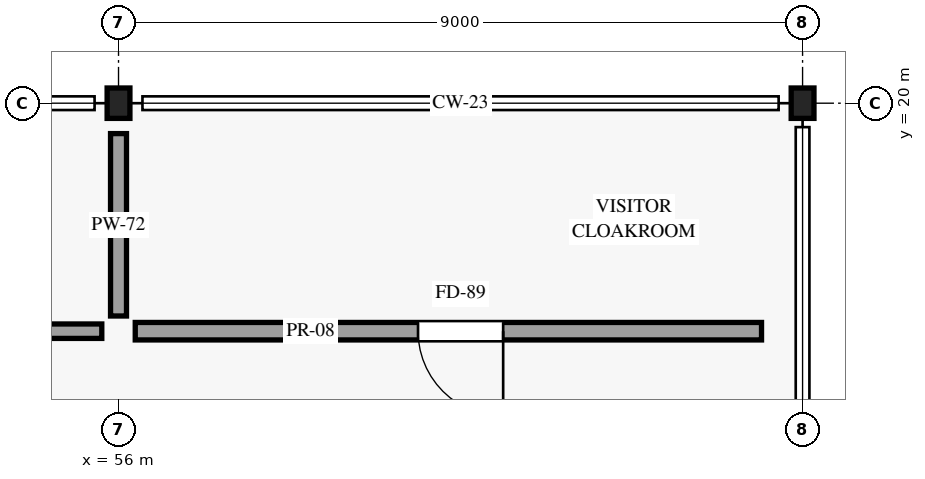
"""IFC4 building model, lengths in metres.
Left out: names, types, materials, properties, quantities, classifications, styles, units other than length and angle.
Written with IfcOpenShell. Run it as: python <this file> out.ifc"""

import sys

from ifc_helpers import new_model, si_unit, direction, frame, frame_2d, origin, origin_2d, place, context, subcontext, project, spatial, rectangle, i_section, extrude, element, fill, save


model = new_model("IFC4")
c1 = context("Model", 3, precision=1e-05, world=origin(), true_north=direction((0.0, 1.0)))
c2 = subcontext(c1, "Body", "Model", "MODEL_VIEW")
j1 = project(units=[si_unit("LENGTHUNIT", "METRE"), si_unit("PLANEANGLEUNIT", "RADIAN")], contexts=[c1])
p1 = place(None, origin())
s1 = spatial("IfcSite", under=j1, at=p1, CompositionType="ELEMENT")
p2 = place(p1, origin())
s2 = spatial("IfcBuilding", under=s1, at=p2, CompositionType="ELEMENT")
p3 = place(p2, frame((0.0, 0.0, 24.0)))
s3 = spatial("IfcBuildingStorey", under=s2, at=p3, CompositionType="ELEMENT", Elevation=24.0)
for number, where, z_axis, x_axis in (
    (1, (56.0, 20.0, 0.0), (0.0, 0.0, 1.0), (1.0, 0.0, 0.0)),
    (2, (65.0, 20.0, 0.0), (0.0, 0.0, 1.0), (1.0, 0.0, 0.0)),
):
    element("IfcColumn", number, at=place(p3, frame(where, z_axis=z_axis, x_axis=x_axis)), inside=s3, PredefinedType="COLUMN", context=c2, shape_type="SweptSolid", body=[
        extrude(i_section(OverallWidth=0.3, OverallDepth=0.4, WebThickness=0.013, FlangeThickness=0.024, FilletRadius=0.027, at=origin_2d()), origin(), (0.0, 0.0, 1.0), 4.8),
    ])
p4 = place(p3, frame((47.22, 17.0, 0.0), z_axis=(0.0, 0.0, 1.0), x_axis=(1.0, 0.0, 0.0)))
e3 = element("IfcWall", 3, at=p4, inside=s3, PredefinedType="PARTITIONING", context=c2, shape_type="SweptSolid", body=[
    extrude(rectangle(XDim=8.56, YDim=0.19, at=frame_2d((4.28, 0.0))), origin(), (0.0, 0.0, 1.0), 2.665),
])
p5 = place(p4, frame((4.82, 0.0, 0.0), z_axis=(0.0, 0.0, 1.0), x_axis=(-1.0, 0.0, 0.0)))
e4 = element("IfcOpeningElement", 4, at=p5, cuts=e3, PredefinedType="OPENING", context=c2, shape_type="SweptSolid", body=[
    extrude(rectangle(XDim=1.04, YDim=2.22, at=frame_2d((0.52, 1.11))), frame((0.0, 0.105, 0.0), z_axis=(0.0, -1.0, 0.0), x_axis=(1.0, 0.0, 0.0)), (0.0, 0.0, 1.0), 0.21),
])
p6 = place(p3, frame((56.0, 17.2, 0.0), z_axis=(0.0, 0.0, 1.0), x_axis=(0.0, 1.0, 0.0)))
e5 = element("IfcWall", 5, at=p6, inside=s3, PredefinedType="PARTITIONING", context=c2, shape_type="SweptSolid", body=[
    extrude(rectangle(XDim=2.4, YDim=0.21, at=frame_2d((1.2, 0.0))), origin(), (0.0, 0.0, 1.0), 2.665),
])
p7 = place(p3, frame((56.22, 17.0, 0.0), z_axis=(0.0, 0.0, 1.0), x_axis=(1.0, 0.0, 0.0)))
e6 = element("IfcWall", 6, at=p7, inside=s3, PredefinedType="PARTITIONING", context=c2, shape_type="SweptSolid", body=[
    extrude(rectangle(XDim=8.24, YDim=0.23, at=frame_2d((4.12, 0.0))), origin(), (0.0, 0.0, 1.0), 2.665),
])
p8 = place(p7, frame((4.841, 0.0, 0.0), z_axis=(0.0, 0.0, 1.0), x_axis=(-1.0, 0.0, 0.0)))
e7 = element("IfcOpeningElement", 7, at=p8, cuts=e6, PredefinedType="OPENING", context=c2, shape_type="SweptSolid", body=[
    extrude(rectangle(XDim=1.12, YDim=2.26, at=frame_2d((0.56, 1.13))), frame((0.0, 0.125, 0.0), z_axis=(0.0, -1.0, 0.0), x_axis=(1.0, 0.0, 0.0)), (0.0, 0.0, 1.0), 0.25),
])
p9 = place(p8, origin())
e8 = element("IfcDoor", 8, at=p9, inside=s3, OperationType="SINGLE_SWING_LEFT", PredefinedType="DOOR", context=c2, shape_type="SweptSolid", body=[
    extrude(rectangle(XDim=1.12, YDim=2.26, at=frame_2d((0.56, 1.13))), frame((0.0, 0.025, 0.0), z_axis=(0.0, -1.0, 0.0), x_axis=(1.0, 0.0, 0.0)), (0.0, 0.0, 1.0), 0.05),
])
fill(e7, e8)
save(model, sys.argv[1])
